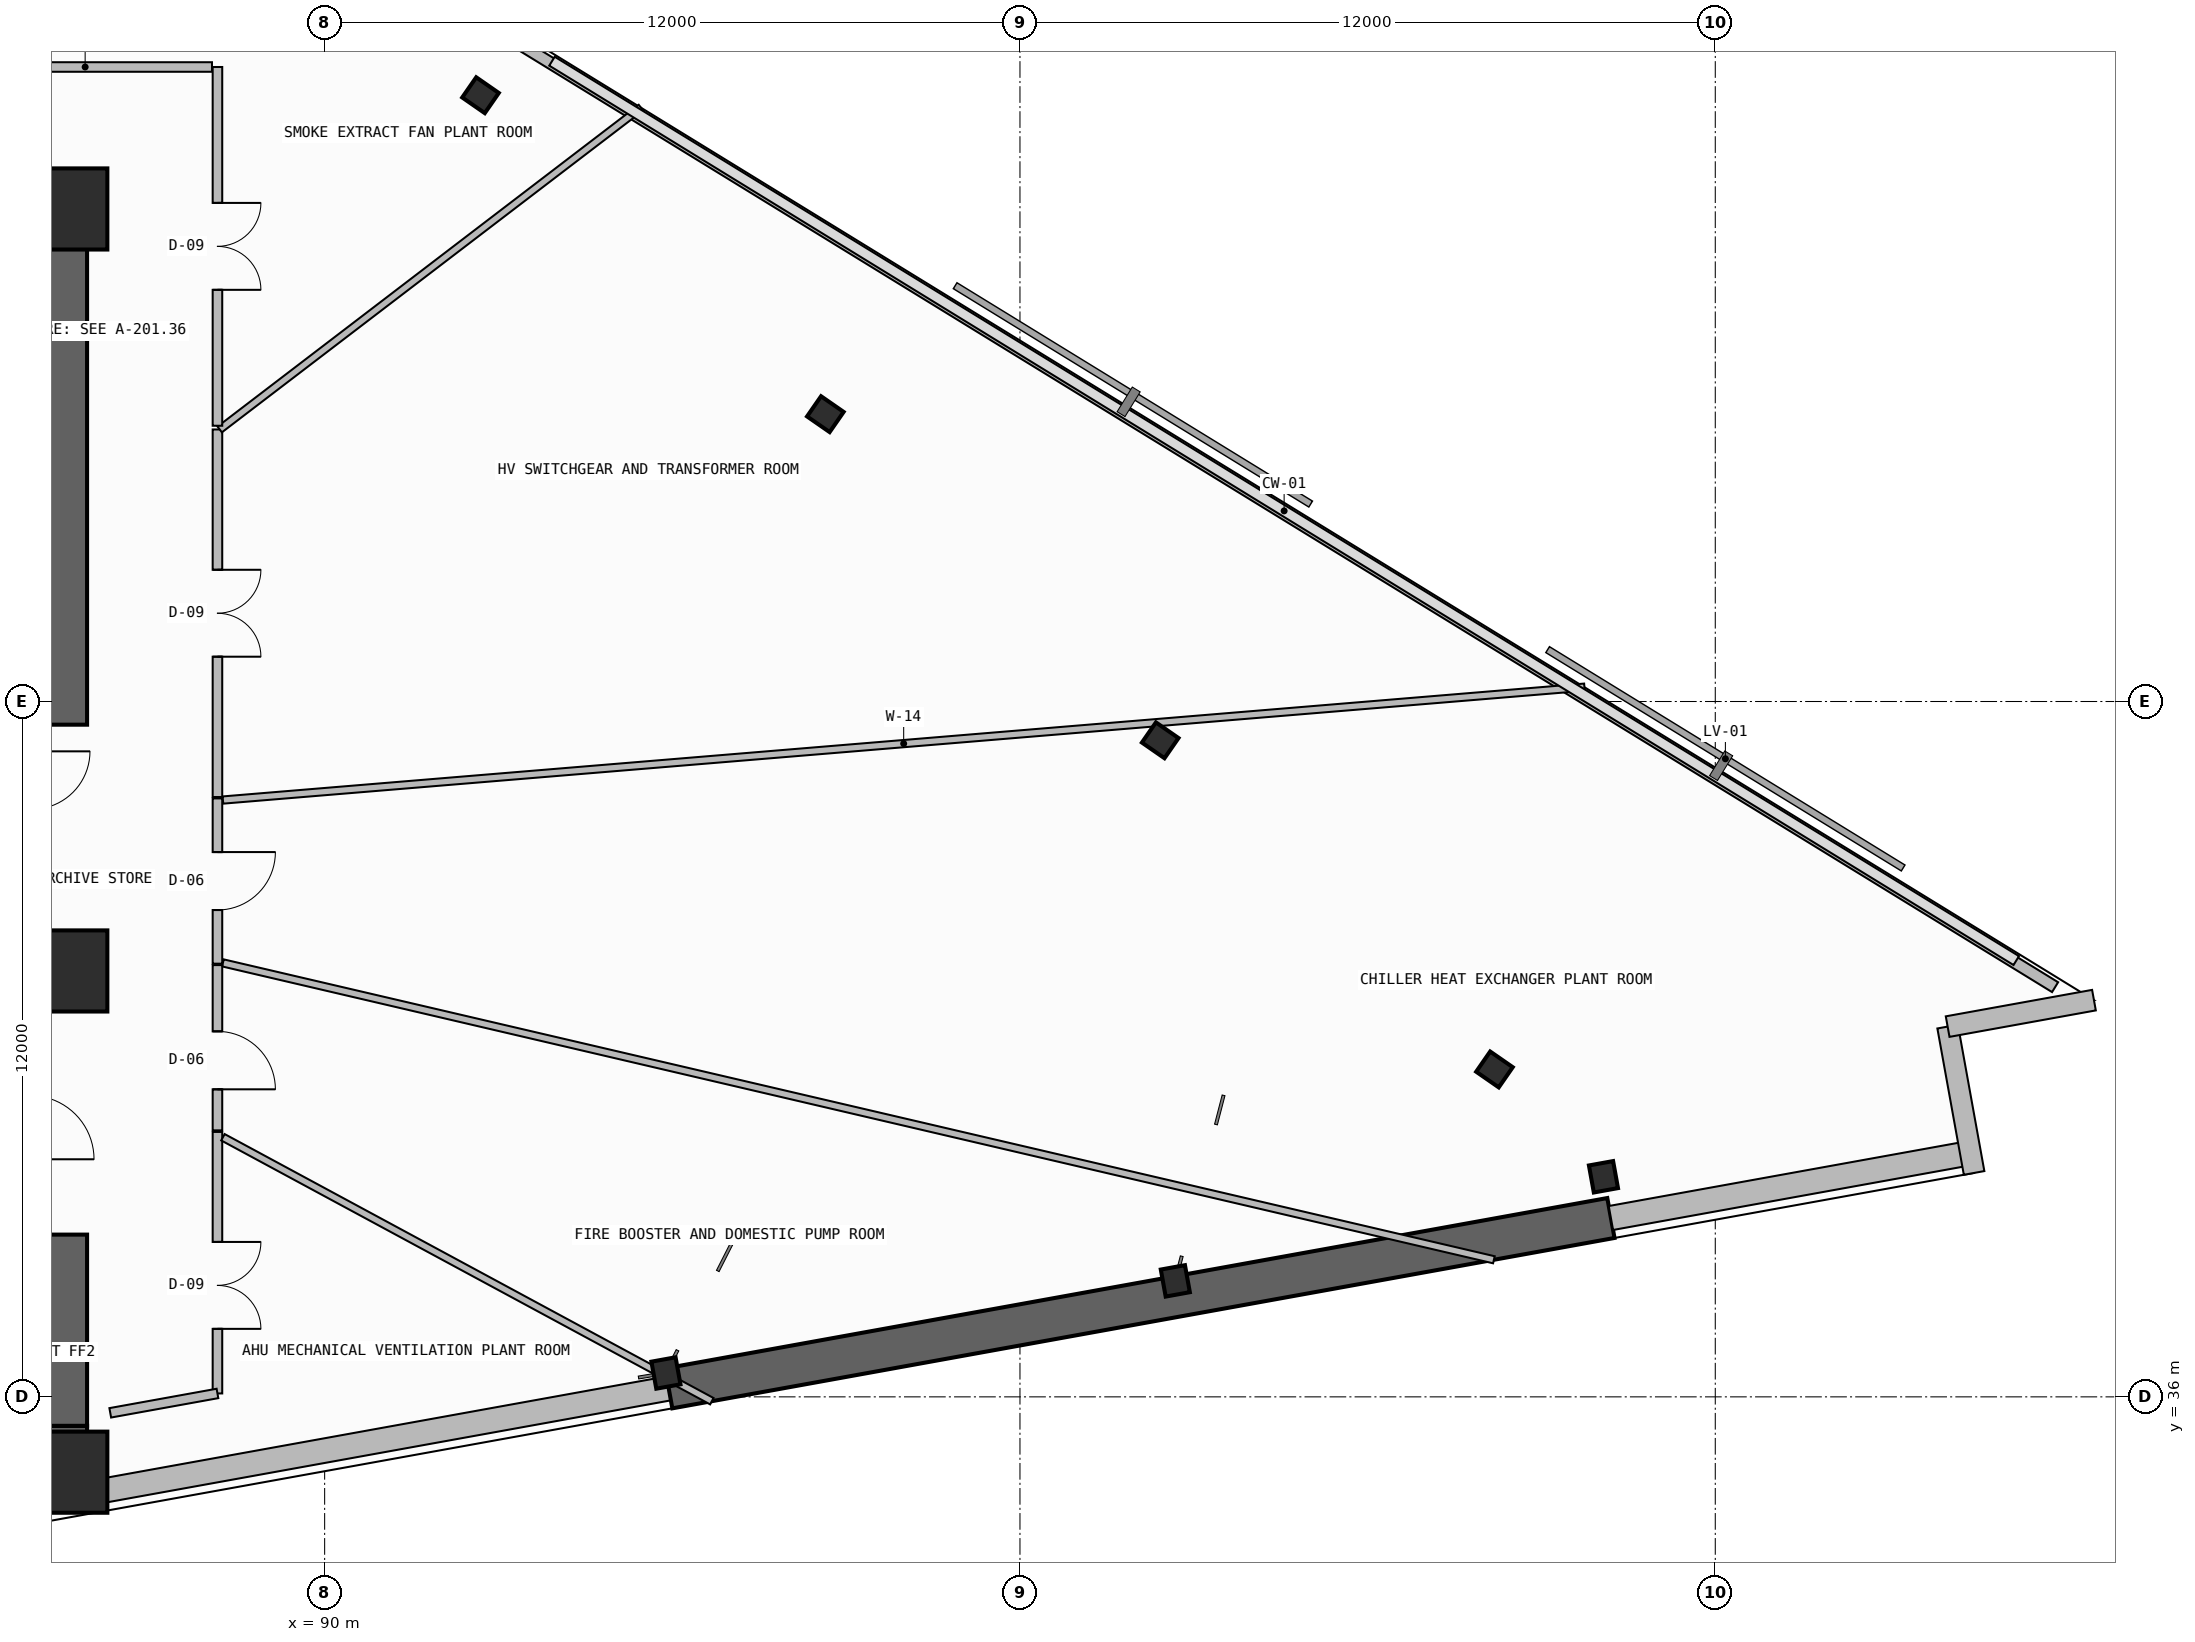
"""IFC4 building model, lengths in metres.
Left out: names, types, materials, properties, quantities, classifications, styles, units other than length and angle.
Written with IfcOpenShell. Run it as: python <this file> out.ifc"""

import sys

from ifc_helpers import new_model, si_unit, direction, frame, frame_2d, origin, origin_2d, place, context, subcontext, project, spatial, rectangle, i_section, extrude, element, fill, save


model = new_model("IFC4")
c1 = context("Model", 3, precision=1e-05, world=origin(), true_north=direction((0.0, 1.0)))
c2 = subcontext(c1, "Body", "Model", "MODEL_VIEW")
j1 = project(units=[si_unit("LENGTHUNIT", "METRE"), si_unit("PLANEANGLEUNIT", "RADIAN")], contexts=[c1])
p1 = place(None, origin())
s1 = spatial("IfcSite", under=j1, at=p1, CompositionType="ELEMENT")
p2 = place(p1, origin())
s2 = spatial("IfcBuilding", under=s1, at=p2, CompositionType="ELEMENT")
p3 = place(p2, frame((0.0, 0.0, 128.1)))
s3 = spatial("IfcBuildingStorey", under=s2, at=p3, CompositionType="ELEMENT", Elevation=128.1)
p4 = place(p3, frame((72.0, 35.05, -0.5), z_axis=(0.0, 0.0, 1.0), x_axis=(1.0, 0.0, 0.0)))
e1 = element("IfcWall", 1, at=p4, inside=s3, PredefinedType="SHEAR", context=c2, shape_type="SweptSolid", body=[
    extrude(rectangle(XDim=13.9, YDim=0.9, at=frame_2d((6.95, 0.0))), origin(), (0.0, 0.0, 1.0), 4.3),
])
p5 = place(p3, frame((85.45, 35.5, -0.5), z_axis=(0.0, 0.0, 1.0), x_axis=(0.0, 1.0, 0.0)))
e2 = element("IfcWall", 2, at=p5, inside=s3, PredefinedType="SHEAR", context=c2, shape_type="SweptSolid", body=[
    extrude(rectangle(XDim=3.3, YDim=0.9, at=frame_2d((1.65, 0.0))), origin(), (0.0, 0.0, 1.0), 4.3),
])
p6 = place(p3, frame((72.0, 56.5, -0.5), z_axis=(0.0, 0.0, 1.0), x_axis=(1.0, 0.0, 0.0)))
e3 = element("IfcWall", 3, at=p6, inside=s3, PredefinedType="SHEAR", context=c2, shape_type="SweptSolid", body=[
    extrude(rectangle(XDim=13.9, YDim=0.9, at=frame_2d((6.95, 0.0))), origin(), (0.0, 0.0, 1.0), 4.3),
])
p7 = place(p3, frame((85.45, 47.6, -0.5), z_axis=(0.0, 0.0, 1.0), x_axis=(0.0, 1.0, 0.0)))
e4 = element("IfcWall", 4, at=p7, inside=s3, PredefinedType="SHEAR", context=c2, shape_type="SweptSolid", body=[
    extrude(rectangle(XDim=8.45, YDim=0.9, at=frame_2d((4.225, 0.0))), origin(), (0.0, 0.0, 1.0), 4.3),
])
for number, where, z_axis, x_axis in (
    (5, (85.55, 34.7, 0.0), (0.0, 0.0, 1.0), (1.0, 0.0, 0.0)),
    (6, (85.55, 43.35, 0.0), (0.0, 0.0, 1.0), (1.0, 0.0, 0.0)),
    (7, (85.55, 56.5, 0.0), (0.0, 0.0, 1.0), (1.0, 0.0, 0.0)),
):
    element("IfcColumn", number, at=place(p3, frame(where, z_axis=z_axis, x_axis=x_axis)), inside=s3, PredefinedType="COLUMN", context=c2, shape_type="SweptSolid", body=[
        extrude(rectangle(XDim=1.4, YDim=1.4, at=origin_2d()), origin(), (0.0, 0.0, 1.0), 4.2),
    ])
for number, where, z_axis, x_axis in (
    (8, (95.89, 36.412, 0.0), (0.0, 0.0, 1.0), (0.984, 0.178, 0.0)),
    (9, (104.681, 38.001, 0.0), (0.0, 0.0, 1.0), (0.984, 0.178, 0.0)),
    (10, (112.07, 39.798, 0.0), (0.0, 0.0, 1.0), (0.984, 0.178, 0.0)),
    (11, (110.189, 41.65, 0.0), (0.0, 0.0, 1.0), (0.57, 0.822, 0.0)),
    (12, (104.42, 47.331, 0.0), (0.0, 0.0, 1.0), (0.57, 0.822, 0.0)),
    (13, (98.641, 52.958, 0.0), (0.0, 0.0, 1.0), (0.57, 0.822, 0.0)),
    (14, (92.69, 58.463, 0.0), (0.0, 0.0, 1.0), (0.57, 0.822, 0.0)),
):
    element("IfcColumn", number, at=place(p3, frame(where, z_axis=z_axis, x_axis=x_axis)), inside=s3, PredefinedType="COLUMN", context=c2, shape_type="SweptSolid", body=[
        extrude(i_section(OverallWidth=0.424, OverallDepth=0.474, WebThickness=0.048, FlangeThickness=0.077, FilletRadius=0.015, at=origin_2d()), origin(), (0.0, 0.0, 1.0), 4.2),
    ])
p8 = place(p3, frame((86.1, 34.367, 0.0), z_axis=(0.0, 0.0, 1.0), x_axis=(0.9840437071, 0.177926902172, 0.0)))
e15 = element("IfcWall", 15, at=p8, inside=s3, PredefinedType="SOLIDWALL", context=c2, shape_type="SweptSolid", body=[
    extrude(rectangle(XDim=9.997, YDim=0.42, at=frame_2d((4.999, 0.0))), origin(), (0.0, 0.0, 1.0), 2.777),
])
p9 = place(p3, frame((95.938, 36.146, -0.5), z_axis=(0.0, 0.0, 1.0), x_axis=(0.984038488288, 0.177955762952, 0.0)))
e16 = element("IfcWall", 16, at=p9, inside=s3, PredefinedType="SHEAR", context=c2, shape_type="SweptSolid", body=[
    extrude(rectangle(XDim=16.525, YDim=0.7, at=frame_2d((8.262, 0.0))), origin(), (0.0, 0.0, 1.0), 4.3),
])
p10 = place(p3, frame((112.199, 39.087, 0.0), z_axis=(0.0, 0.0, 1.0), x_axis=(0.984042888215, 0.177931431042, 0.0)))
e17 = element("IfcWall", 17, at=p10, inside=s3, PredefinedType="SOLIDWALL", context=c2, shape_type="SweptSolid", body=[
    extrude(rectangle(XDim=6.306, YDim=0.42, at=frame_2d((3.153, 0.0))), origin(), (0.0, 0.0, 1.0), 3.8),
])
p11 = place(p3, frame((118.467, 39.864, 0.0), z_axis=(0.0, 0.0, 1.0), x_axis=(-0.177897493713, 0.984049024048, 0.0)))
e18 = element("IfcWall", 18, at=p11, inside=s3, PredefinedType="SOLIDWALL", context=c2, shape_type="SweptSolid", body=[
    extrude(rectangle(XDim=2.566, YDim=0.36, at=frame_2d((1.283, 0.0))), origin(), (0.0, 0.0, 1.0), 3.8),
])
p12 = place(p3, frame((118.01, 42.39, 0.0), z_axis=(0.0, 0.0, 1.0), x_axis=(0.984046012923, 0.177914149102, 0.0)))
e19 = element("IfcWall", 19, at=p12, inside=s3, PredefinedType="SOLIDWALL", context=c2, shape_type="SweptSolid", body=[
    extrude(rectangle(XDim=2.566, YDim=0.36, at=frame_2d((1.283, 0.0))), origin(), (0.0, 0.0, 1.0), 3.8),
])
p13 = place(p3, frame((119.865, 43.07, 0.0), z_axis=(0.0, 0.0, 1.0), x_axis=(-0.852110824326, 0.52336138859, 0.0)))
e20 = element("IfcWall", 20, at=p13, inside=s3, PredefinedType="PARAPET", context=c2, shape_type="SweptSolid", body=[
    extrude(rectangle(XDim=33.932, YDim=0.2, at=frame_2d((16.966, 0.0))), origin(), (0.0, 0.0, 1.0), 1.15),
])
p14 = place(p3, frame((88.15, 36.059, 0.0), z_axis=(0.0, 0.0, 1.0), x_axis=(0.0, 1.0, 0.0)))
e21 = element("IfcWall", 21, at=p14, inside=s3, PredefinedType="PARTITIONING", context=c2, shape_type="SweptSolid", body=[
    extrude(rectangle(XDim=4.513, YDim=0.165, at=frame_2d((2.257, 0.0))), origin(), (0.0, 0.0, 1.0), 3.8),
])
p15 = place(p14, frame((1.115, 0.0, 0.0)))
e22 = element("IfcOpeningElement", 22, at=p15, cuts=e21, PredefinedType="OPENING", context=c2, shape_type="SweptSolid", body=[
    extrude(rectangle(XDim=1.5, YDim=2.25, at=frame_2d((0.75, 1.125))), frame((0.0, 0.093, 0.0), z_axis=(0.0, -1.0, 0.0), x_axis=(1.0, 0.0, 0.0)), (0.0, 0.0, 1.0), 0.185),
])
p16 = place(p3, frame((86.3, 35.724, 0.0), z_axis=(0.0, 0.0, 1.0), x_axis=(0.984043990378, 0.177925335465, 0.0)))
e23 = element("IfcWall", 23, at=p16, inside=s3, PredefinedType="PARTITIONING", context=c2, shape_type="SweptSolid", body=[
    extrude(rectangle(XDim=1.88, YDim=0.165, at=frame_2d((0.94, 0.0))), origin(), (0.0, 0.0, 1.0), 3.8),
])
p17 = place(p3, frame((88.244, 40.48, 0.0), z_axis=(0.0, 0.0, 1.0), x_axis=(0.879963723741, -0.475040887609, 0.0)))
e24 = element("IfcWall", 24, at=p17, inside=s3, PredefinedType="PARTITIONING", context=c2, shape_type="SweptSolid", body=[
    extrude(rectangle(XDim=9.589, YDim=0.125, at=frame_2d((4.794, 0.0))), origin(), (0.0, 0.0, 1.0), 2.777),
])
p18 = place(p3, frame((88.15, 43.476, 0.0), z_axis=(0.0, 0.0, 1.0), x_axis=(0.0, 1.0, 0.0)))
e25 = element("IfcWall", 25, at=p18, inside=s3, PredefinedType="PARTITIONING", context=c2, shape_type="SweptSolid", body=[
    extrude(rectangle(XDim=2.852, YDim=0.165, at=frame_2d((1.426, 0.0))), origin(), (0.0, 0.0, 1.0), 2.777),
])
p19 = place(p18, frame((0.926, 0.0, 0.0)))
e26 = element("IfcOpeningElement", 26, at=p19, cuts=e25, PredefinedType="OPENING", context=c2, shape_type="SweptSolid", body=[
    extrude(rectangle(XDim=1.0, YDim=2.2, at=frame_2d((0.5, 1.1))), frame((0.0, 0.093, 0.0), z_axis=(0.0, -1.0, 0.0), x_axis=(1.0, 0.0, 0.0)), (0.0, 0.0, 1.0), 0.185),
])
p20 = place(p3, frame((110.179, 38.366, 0.0), z_axis=(0.0, 0.0, 1.0), x_axis=(-0.973790979641, 0.227444780043, 0.0)))
e27 = element("IfcWall", 27, at=p20, inside=s3, PredefinedType="PARTITIONING", context=c2, shape_type="SweptSolid", body=[
    extrude(rectangle(XDim=22.525, YDim=0.125, at=frame_2d((11.263, 0.0))), origin(), (0.0, 0.0, 1.0), 2.777),
])
p21 = place(p3, frame((88.244, 46.3, 0.0), z_axis=(0.0, 0.0, 1.0), x_axis=(0.996582011134, 0.082609291754, 0.0)))
e28 = element("IfcWall", 28, at=p21, inside=s3, PredefinedType="PARTITIONING", context=c2, shape_type="SweptSolid", body=[
    extrude(rectangle(XDim=23.578, YDim=0.125, at=frame_2d((11.789, 0.0))), origin(), (0.0, 0.0, 1.0), 2.777),
])
p22 = place(p3, frame((88.15, 40.599, 0.0), z_axis=(0.0, 0.0, 1.0), x_axis=(0.0, 1.0, 0.0)))
e29 = element("IfcWall", 29, at=p22, inside=s3, PredefinedType="PARTITIONING", context=c2, shape_type="SweptSolid", body=[
    extrude(rectangle(XDim=2.852, YDim=0.165, at=frame_2d((1.426, 0.0))), origin(), (0.0, 0.0, 1.0), 2.777),
])
p23 = place(p22, frame((0.708, 0.0, 0.0)))
e30 = element("IfcOpeningElement", 30, at=p23, cuts=e29, PredefinedType="OPENING", context=c2, shape_type="SweptSolid", body=[
    extrude(rectangle(XDim=1.0, YDim=2.2, at=frame_2d((0.5, 1.1))), frame((0.0, 0.093, 0.0), z_axis=(0.0, -1.0, 0.0), x_axis=(1.0, 0.0, 0.0)), (0.0, 0.0, 1.0), 0.185),
])
p24 = place(p3, frame((88.15, 46.352, 0.0), z_axis=(0.0, 0.0, 1.0), x_axis=(0.0, 1.0, 0.0)))
e31 = element("IfcWall", 31, at=p24, inside=s3, PredefinedType="PARTITIONING", context=c2, shape_type="SweptSolid", body=[
    extrude(rectangle(XDim=6.343, YDim=0.165, at=frame_2d((3.172, 0.0))), origin(), (0.0, 0.0, 1.0), 3.8),
])
p25 = place(p24, frame((2.422, 0.0, 0.0)))
e32 = element("IfcOpeningElement", 32, at=p25, cuts=e31, PredefinedType="OPENING", context=c2, shape_type="SweptSolid", body=[
    extrude(rectangle(XDim=1.5, YDim=2.25, at=frame_2d((0.75, 1.125))), frame((0.0, 0.093, 0.0), z_axis=(0.0, -1.0, 0.0), x_axis=(1.0, 0.0, 0.0)), (0.0, 0.0, 1.0), 0.185),
])
p26 = place(p3, frame((88.189, 52.695, 0.0), z_axis=(0.0, 0.0, 1.0), x_axis=(0.794642575685, 0.607077570751, 0.0)))
e33 = element("IfcWall", 33, at=p26, inside=s3, PredefinedType="PARTITIONING", context=c2, shape_type="SweptSolid", body=[
    extrude(rectangle(XDim=9.148, YDim=0.125, at=frame_2d((4.574, 0.0))), origin(), (0.0, 0.0, 1.0), 2.777),
])
p27 = place(p3, frame((88.15, 52.759, 0.0), z_axis=(0.0, 0.0, 1.0), x_axis=(0.0, 1.0, 0.0)))
e34 = element("IfcWall", 34, at=p27, inside=s3, PredefinedType="PARTITIONING", context=c2, shape_type="SweptSolid", body=[
    extrude(rectangle(XDim=6.191, YDim=0.165, at=frame_2d((3.096, 0.0))), origin(), (0.0, 0.0, 1.0), 2.777),
])
p28 = place(p27, frame((2.346, 0.0, 0.0)))
e35 = element("IfcOpeningElement", 35, at=p28, cuts=e34, PredefinedType="OPENING", context=c2, shape_type="SweptSolid", body=[
    extrude(rectangle(XDim=1.5, YDim=2.25, at=frame_2d((0.75, 1.125))), frame((0.0, 0.093, 0.0), z_axis=(0.0, -1.0, 0.0), x_axis=(1.0, 0.0, 0.0)), (0.0, 0.0, 1.0), 0.185),
])
p29 = place(p3, frame((88.055, 58.95, 0.0), z_axis=(0.0, 0.0, 1.0), x_axis=(-1.0, 0.0, 0.0)))
e36 = element("IfcWall", 36, at=p29, inside=s3, PredefinedType="PARTITIONING", context=c2, shape_type="SweptSolid", body=[
    extrude(rectangle(XDim=4.378, YDim=0.165, at=frame_2d((2.189, 0.0))), origin(), (0.0, 0.0, 1.0), 2.777),
])
p30 = place(p3, frame((83.751, 59.044, 0.0), z_axis=(0.0, 0.0, 1.0), x_axis=(0.343972438463, 0.938979745031, 0.0)))
e37 = element("IfcWall", 37, at=p30, inside=s3, PredefinedType="PARTITIONING", context=c2, shape_type="SweptSolid", body=[
    extrude(rectangle(XDim=4.957, YDim=0.125, at=frame_2d((2.479, 0.0))), origin(), (0.0, 0.0, 1.0), 3.8),
])
p31 = place(p15, frame((1.5, 0.0, 0.0), z_axis=(0.0, 0.0, 1.0), x_axis=(-1.0, 0.0, 0.0)))
e38 = element("IfcDoor", 38, at=p31, inside=s3, OperationType="DOUBLE_DOOR_SINGLE_SWING", PredefinedType="DOOR", context=c2, shape_type="SweptSolid", body=[
    extrude(rectangle(XDim=1.5, YDim=2.25, at=frame_2d((0.75, 1.125))), frame((0.0, 0.025, 0.0), z_axis=(0.0, -1.0, 0.0), x_axis=(1.0, 0.0, 0.0)), (0.0, 0.0, 1.0), 0.05),
])
fill(e22, e38)
p32 = place(p19, frame((1.0, 0.0, 0.0), z_axis=(0.0, 0.0, 1.0), x_axis=(-1.0, 0.0, 0.0)))
e39 = element("IfcDoor", 39, at=p32, inside=s3, OperationType="SINGLE_SWING_LEFT", PredefinedType="DOOR", context=c2, shape_type="SweptSolid", body=[
    extrude(rectangle(XDim=1.0, YDim=2.2, at=frame_2d((0.5, 1.1))), frame((0.0, 0.025, 0.0), z_axis=(0.0, -1.0, 0.0), x_axis=(1.0, 0.0, 0.0)), (0.0, 0.0, 1.0), 0.05),
])
fill(e26, e39)
p33 = place(p23, frame((1.0, 0.0, 0.0), z_axis=(0.0, 0.0, 1.0), x_axis=(-1.0, 0.0, 0.0)))
e40 = element("IfcDoor", 40, at=p33, inside=s3, OperationType="SINGLE_SWING_RIGHT", PredefinedType="DOOR", context=c2, shape_type="SweptSolid", body=[
    extrude(rectangle(XDim=1.0, YDim=2.2, at=frame_2d((0.5, 1.1))), frame((0.0, 0.025, 0.0), z_axis=(0.0, -1.0, 0.0), x_axis=(1.0, 0.0, 0.0)), (0.0, 0.0, 1.0), 0.05),
])
fill(e30, e40)
p34 = place(p25, frame((1.5, 0.0, 0.0), z_axis=(0.0, 0.0, 1.0), x_axis=(-1.0, 0.0, 0.0)))
e41 = element("IfcDoor", 41, at=p34, inside=s3, OperationType="DOUBLE_DOOR_SINGLE_SWING", PredefinedType="DOOR", context=c2, shape_type="SweptSolid", body=[
    extrude(rectangle(XDim=1.5, YDim=2.25, at=frame_2d((0.75, 1.125))), frame((0.0, 0.025, 0.0), z_axis=(0.0, -1.0, 0.0), x_axis=(1.0, 0.0, 0.0)), (0.0, 0.0, 1.0), 0.05),
])
fill(e32, e41)
p35 = place(p28, frame((1.5, 0.0, 0.0), z_axis=(0.0, 0.0, 1.0), x_axis=(-1.0, 0.0, 0.0)))
e42 = element("IfcDoor", 42, at=p35, inside=s3, OperationType="DOUBLE_DOOR_SINGLE_SWING", PredefinedType="DOOR", context=c2, shape_type="SweptSolid", body=[
    extrude(rectangle(XDim=1.5, YDim=2.25, at=frame_2d((0.75, 1.125))), frame((0.0, 0.025, 0.0), z_axis=(0.0, -1.0, 0.0), x_axis=(1.0, 0.0, 0.0)), (0.0, 0.0, 1.0), 0.05),
])
fill(e35, e42)
save(model, sys.argv[1])
